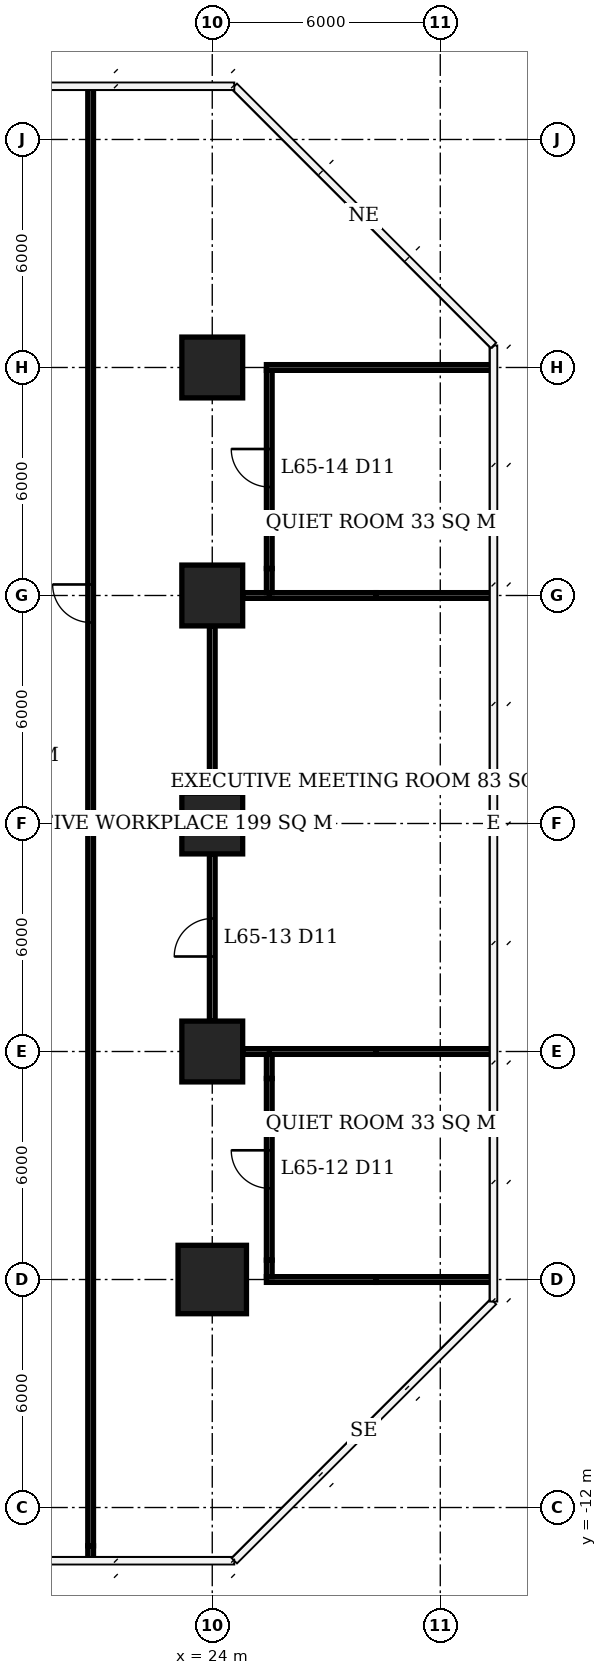
"""IFC4 building model, lengths in metres.
Left out: names, types, materials, properties, quantities, classifications, styles, units other than length and angle.
Written with IfcOpenShell. Run it as: python <this file> out.ifc"""

import sys

from ifc_helpers import new_model, si_unit, direction, frame, frame_2d, origin, origin_2d, place, context, subcontext, project, spatial, rectangle, extrude, element, fill, save


model = new_model("IFC4")
c1 = context("Model", 3, precision=1e-05, world=origin(), true_north=direction((0.0, 1.0)))
c2 = subcontext(c1, "Body", "Model", "MODEL_VIEW")
j1 = project(units=[si_unit("LENGTHUNIT", "METRE"), si_unit("PLANEANGLEUNIT", "RADIAN")], contexts=[c1])
p1 = place(None, origin())
s1 = spatial("IfcSite", under=j1, at=p1, CompositionType="ELEMENT")
p2 = place(p1, origin())
s2 = spatial("IfcBuilding", under=s1, at=p2, CompositionType="ELEMENT")
p3 = place(p2, frame((0.0, 0.0, 264.5)))
s3 = spatial("IfcBuildingStorey", under=s2, at=p3, CompositionType="ELEMENT", Elevation=264.5)
p4 = place(p3, frame((24.0, -6.0, 0.0), z_axis=(0.0, 0.0, 1.0), x_axis=(1.0, 0.0, 0.0)))
e1 = element("IfcColumn", 1, at=p4, inside=s3, PredefinedType="COLUMN", context=c2, shape_type="SweptSolid", body=[
    extrude(rectangle(XDim=1.8, YDim=1.8, at=origin_2d()), origin(), (0.0, 0.0, 1.0), 3.9),
])
for number, where, z_axis, x_axis in (
    (2, (24.0, 0.0, 0.0), (0.0, 0.0, 1.0), (1.0, 0.0, 0.0)),
    (3, (24.0, 6.0, 0.0), (0.0, 0.0, 1.0), (1.0, 0.0, 0.0)),
    (4, (24.0, 12.0, 0.0), (0.0, 0.0, 1.0), (1.0, 0.0, 0.0)),
    (5, (24.0, 18.0, 0.0), (0.0, 0.0, 1.0), (1.0, 0.0, 0.0)),
):
    element("IfcColumn", number, at=place(p3, frame(where, z_axis=z_axis, x_axis=x_axis)), inside=s3, PredefinedType="COLUMN", context=c2, shape_type="SweptSolid", body=[
        extrude(rectangle(XDim=1.6, YDim=1.6, at=origin_2d()), origin(), (0.0, 0.0, 1.0), 3.9),
    ])
p5 = place(p3, frame((25.425, -6.0, 0.0), z_axis=(0.0, 0.0, 1.0), x_axis=(1.0, 0.0, 0.0)))
e6 = element("IfcWall", 6, at=p5, inside=s3, PredefinedType="PARTITIONING", context=c2, shape_type="SweptSolid", body=[
    extrude(rectangle(XDim=2.885, YDim=0.15, at=frame_2d((1.442, 0.0))), origin(), (0.0, 0.0, 1.0), 2.65),
])
p6 = place(p3, frame((28.31, -6.0, 0.0), z_axis=(0.0, 0.0, 1.0), x_axis=(1.0, 0.0, 0.0)))
e7 = element("IfcWall", 7, at=p6, inside=s3, PredefinedType="PARTITIONING", context=c2, shape_type="SweptSolid", body=[
    extrude(rectangle(XDim=3.065, YDim=0.15, at=frame_2d((1.532, 0.0))), origin(), (0.0, 0.0, 1.0), 3.65),
])
p7 = place(p3, frame((24.8, 0.0, 0.0), z_axis=(0.0, 0.0, 1.0), x_axis=(1.0, 0.0, 0.0)))
e8 = element("IfcWall", 8, at=p7, inside=s3, PredefinedType="PARTITIONING", context=c2, shape_type="SweptSolid", body=[
    extrude(rectangle(XDim=0.775, YDim=0.15, at=frame_2d((0.387, 0.0))), origin(), (0.0, 0.0, 1.0), 2.65),
])
p8 = place(p3, frame((25.5, 0.0, 0.0), z_axis=(0.0, 0.0, 1.0), x_axis=(1.0, 0.0, 0.0)))
e9 = element("IfcWall", 9, at=p8, inside=s3, PredefinedType="PARTITIONING", context=c2, shape_type="SweptSolid", body=[
    extrude(rectangle(XDim=2.81, YDim=0.15, at=frame_2d((1.405, 0.0))), origin(), (0.0, 0.0, 1.0), 2.65),
])
p9 = place(p3, frame((28.31, 0.0, 0.0), z_axis=(0.0, 0.0, 1.0), x_axis=(1.0, 0.0, 0.0)))
e10 = element("IfcWall", 10, at=p9, inside=s3, PredefinedType="PARTITIONING", context=c2, shape_type="SweptSolid", body=[
    extrude(rectangle(XDim=3.065, YDim=0.15, at=frame_2d((1.532, 0.0))), origin(), (0.0, 0.0, 1.0), 3.65),
])
p10 = place(p3, frame((24.8, 12.0, 0.0), z_axis=(0.0, 0.0, 1.0), x_axis=(1.0, 0.0, 0.0)))
e11 = element("IfcWall", 11, at=p10, inside=s3, PredefinedType="PARTITIONING", context=c2, shape_type="SweptSolid", body=[
    extrude(rectangle(XDim=0.775, YDim=0.15, at=frame_2d((0.387, 0.0))), origin(), (0.0, 0.0, 1.0), 2.65),
])
p11 = place(p3, frame((25.5, 12.0, 0.0), z_axis=(0.0, 0.0, 1.0), x_axis=(1.0, 0.0, 0.0)))
e12 = element("IfcWall", 12, at=p11, inside=s3, PredefinedType="PARTITIONING", context=c2, shape_type="SweptSolid", body=[
    extrude(rectangle(XDim=2.81, YDim=0.15, at=frame_2d((1.405, 0.0))), origin(), (0.0, 0.0, 1.0), 2.65),
])
p12 = place(p3, frame((28.31, 12.0, 0.0), z_axis=(0.0, 0.0, 1.0), x_axis=(1.0, 0.0, 0.0)))
e13 = element("IfcWall", 13, at=p12, inside=s3, PredefinedType="PARTITIONING", context=c2, shape_type="SweptSolid", body=[
    extrude(rectangle(XDim=3.065, YDim=0.15, at=frame_2d((1.532, 0.0))), origin(), (0.0, 0.0, 1.0), 3.65),
])
p13 = place(p3, frame((25.425, 18.0, 0.0), z_axis=(0.0, 0.0, 1.0), x_axis=(1.0, 0.0, 0.0)))
e14 = element("IfcWall", 14, at=p13, inside=s3, PredefinedType="PARTITIONING", context=c2, shape_type="SweptSolid", body=[
    extrude(rectangle(XDim=5.95, YDim=0.15, at=frame_2d((2.975, 0.0))), origin(), (0.0, 0.0, 1.0), 3.65),
])
p14 = place(p3, frame((24.0, 0.8, 0.0), z_axis=(0.0, 0.0, 1.0), x_axis=(0.0, 1.0, 0.0)))
e15 = element("IfcWall", 15, at=p14, inside=s3, PredefinedType="PARTITIONING", context=c2, shape_type="SweptSolid", body=[
    extrude(rectangle(XDim=4.4, YDim=0.15, at=frame_2d((2.2, 0.0))), origin(), (0.0, 0.0, 1.0), 3.65),
])
p15 = place(p14, frame((1.7, 0.0, 0.0)))
e16 = element("IfcOpeningElement", 16, at=p15, cuts=e15, PredefinedType="OPENING", context=c2, shape_type="SweptSolid", body=[
    extrude(rectangle(XDim=1.0, YDim=2.4, at=frame_2d((0.5, 1.2))), frame((0.0, 0.085, 0.0), z_axis=(0.0, -1.0, 0.0), x_axis=(1.0, 0.0, 0.0)), (0.0, 0.0, 1.0), 0.17),
])
p16 = place(p3, frame((24.0, 6.8, 0.0), z_axis=(0.0, 0.0, 1.0), x_axis=(0.0, 1.0, 0.0)))
e17 = element("IfcWall", 17, at=p16, inside=s3, PredefinedType="PARTITIONING", context=c2, shape_type="SweptSolid", body=[
    extrude(rectangle(XDim=4.4, YDim=0.15, at=frame_2d((2.2, 0.0))), origin(), (0.0, 0.0, 1.0), 3.65),
])
p17 = place(p3, frame((25.5, -5.925, 0.0), z_axis=(0.0, 0.0, 1.0), x_axis=(0.0, 1.0, 0.0)))
e18 = element("IfcWall", 18, at=p17, inside=s3, PredefinedType="PARTITIONING", context=c2, shape_type="SweptSolid", body=[
    extrude(rectangle(XDim=0.435, YDim=0.15, at=frame_2d((0.218, 0.0))), origin(), (0.0, 0.0, 1.0), 2.65),
])
p18 = place(p3, frame((25.5, -5.49, 0.0), z_axis=(0.0, 0.0, 1.0), x_axis=(0.0, 1.0, 0.0)))
e19 = element("IfcWall", 19, at=p18, inside=s3, PredefinedType="PARTITIONING", context=c2, shape_type="SweptSolid", body=[
    extrude(rectangle(XDim=4.78, YDim=0.15, at=frame_2d((2.39, 0.0))), origin(), (0.0, 0.0, 1.0), 3.65),
])
p19 = place(p18, frame((1.89, 0.0, 0.0)))
e20 = element("IfcOpeningElement", 20, at=p19, cuts=e19, PredefinedType="OPENING", context=c2, shape_type="SweptSolid", body=[
    extrude(rectangle(XDim=1.0, YDim=2.4, at=frame_2d((0.5, 1.2))), frame((0.0, 0.085, 0.0), z_axis=(0.0, -1.0, 0.0), x_axis=(1.0, 0.0, 0.0)), (0.0, 0.0, 1.0), 0.17),
])
for number, where, z_axis, x_axis in (
    (21, (25.5, -0.71, 0.0), (0.0, 0.0, 1.0), (0.0, 1.0, 0.0)),
    (22, (25.5, 12.075, 0.0), (0.0, 0.0, 1.0), (0.0, 1.0, 0.0)),
):
    element("IfcWall", number, at=place(p3, frame(where, z_axis=z_axis, x_axis=x_axis)), inside=s3, PredefinedType="PARTITIONING", context=c2, shape_type="SweptSolid", body=[
        extrude(rectangle(XDim=0.635, YDim=0.15, at=frame_2d((0.317, 0.0))), origin(), (0.0, 0.0, 1.0), 2.65),
    ])
p20 = place(p3, frame((25.5, 12.71, 0.0), z_axis=(0.0, 0.0, 1.0), x_axis=(0.0, 1.0, 0.0)))
e23 = element("IfcWall", 23, at=p20, inside=s3, PredefinedType="PARTITIONING", context=c2, shape_type="SweptSolid", body=[
    extrude(rectangle(XDim=5.215, YDim=0.15, at=frame_2d((2.607, 0.0))), origin(), (0.0, 0.0, 1.0), 3.65),
])
p21 = place(p20, frame((2.145, 0.0, 0.0)))
e24 = element("IfcOpeningElement", 24, at=p21, cuts=e23, PredefinedType="OPENING", context=c2, shape_type="SweptSolid", body=[
    extrude(rectangle(XDim=1.0, YDim=2.4, at=frame_2d((0.5, 1.2))), frame((0.0, 0.085, 0.0), z_axis=(0.0, -1.0, 0.0), x_axis=(1.0, 0.0, 0.0)), (0.0, 0.0, 1.0), 0.17),
])
p22 = place(p3, frame((20.8, -13.375, 0.0), z_axis=(0.0, 0.0, 1.0), x_axis=(0.0, 1.0, 0.0)))
e25 = element("IfcWall", 25, at=p22, inside=s3, PredefinedType="PARTITIONING", context=c2, shape_type="SweptSolid", body=[
    extrude(rectangle(XDim=0.367, YDim=0.15, at=frame_2d((0.184, 0.0))), origin(), (0.0, 0.0, 1.0), 2.65),
])
p23 = place(p3, frame((20.8, -13.008, 0.0), z_axis=(0.0, 0.0, 1.0), x_axis=(0.0, 1.0, 0.0)))
e26 = element("IfcWall", 26, at=p23, inside=s3, PredefinedType="PARTITIONING", context=c2, shape_type="SweptSolid", body=[
    extrude(rectangle(XDim=38.383, YDim=0.15, at=frame_2d((19.191, 0.0))), origin(), (0.0, 0.0, 1.0), 3.65),
])
p24 = place(p23, frame((24.298, 0.0, 0.0)))
e27 = element("IfcOpeningElement", 27, at=p24, cuts=e26, PredefinedType="OPENING", context=c2, shape_type="SweptSolid", body=[
    extrude(rectangle(XDim=1.0, YDim=2.4, at=frame_2d((0.5, 1.2))), frame((0.0, 0.085, 0.0), z_axis=(0.0, -1.0, 0.0), x_axis=(1.0, 0.0, 0.0)), (0.0, 0.0, 1.0), 0.17),
])
p25 = place(p19, origin())
e28 = element("IfcDoor", 28, at=p25, inside=s3, OperationType="SINGLE_SWING_RIGHT", PredefinedType="DOOR", context=c2, shape_type="SweptSolid", body=[
    extrude(rectangle(XDim=1.0, YDim=2.4, at=frame_2d((0.5, 1.2))), frame((0.0, 0.025, 0.0), z_axis=(0.0, -1.0, 0.0), x_axis=(1.0, 0.0, 0.0)), (0.0, 0.0, 1.0), 0.05),
])
fill(e20, e28)
p26 = place(p15, origin())
e29 = element("IfcDoor", 29, at=p26, inside=s3, OperationType="SINGLE_SWING_LEFT", PredefinedType="DOOR", context=c2, shape_type="SweptSolid", body=[
    extrude(rectangle(XDim=1.0, YDim=2.4, at=frame_2d((0.5, 1.2))), frame((0.0, 0.025, 0.0), z_axis=(0.0, -1.0, 0.0), x_axis=(1.0, 0.0, 0.0)), (0.0, 0.0, 1.0), 0.05),
])
fill(e16, e29)
p27 = place(p21, origin())
e30 = element("IfcDoor", 30, at=p27, inside=s3, OperationType="SINGLE_SWING_RIGHT", PredefinedType="DOOR", context=c2, shape_type="SweptSolid", body=[
    extrude(rectangle(XDim=1.0, YDim=2.4, at=frame_2d((0.5, 1.2))), frame((0.0, 0.025, 0.0), z_axis=(0.0, -1.0, 0.0), x_axis=(1.0, 0.0, 0.0)), (0.0, 0.0, 1.0), 0.05),
])
fill(e24, e30)
p28 = place(p24, origin())
e31 = element("IfcDoor", 31, at=p28, inside=s3, OperationType="SINGLE_SWING_RIGHT", PredefinedType="DOOR", context=c2, shape_type="SweptSolid", body=[
    extrude(rectangle(XDim=1.0, YDim=2.4, at=frame_2d((0.5, 1.2))), frame((0.0, 0.025, 0.0), z_axis=(0.0, -1.0, 0.0), x_axis=(1.0, 0.0, 0.0)), (0.0, 0.0, 1.0), 0.05),
])
fill(e27, e31)
save(model, sys.argv[1])
